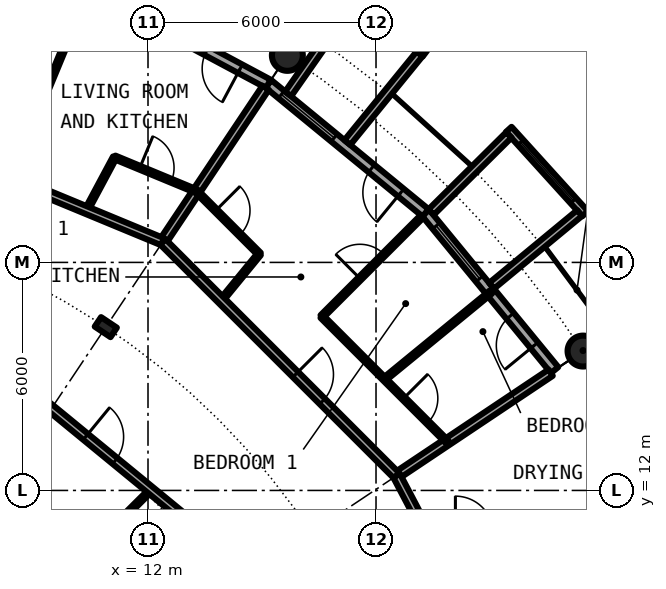
"""IFC4 building model, lengths in metres.
Left out: names, types, materials, properties, quantities, classifications, styles, units other than length and angle.
Written with IfcOpenShell. Run it as: python <this file> out.ifc"""

import sys

from ifc_helpers import new_model, si_unit, direction, frame, frame_2d, origin, origin_2d, place, context, subcontext, project, spatial, rectangle, circle, hollow_circle, i_section, extrude, element, fill, save


model = new_model("IFC4")
c1 = context("Model", 3, precision=1e-05, world=origin(), true_north=direction((0.0, 1.0)))
c2 = subcontext(c1, "Body", "Model", "MODEL_VIEW")
j1 = project(units=[si_unit("LENGTHUNIT", "METRE"), si_unit("PLANEANGLEUNIT", "RADIAN")], contexts=[c1])
p1 = place(None, origin())
s1 = spatial("IfcSite", under=j1, at=p1, CompositionType="ELEMENT")
p2 = place(p1, origin())
s2 = spatial("IfcBuilding", under=s1, at=p2, CompositionType="ELEMENT")
p3 = place(p2, frame((0.0, 0.0, 170.75)))
s3 = spatial("IfcBuildingStorey", under=s2, at=p3, CompositionType="ELEMENT", Elevation=170.75)
for number, where, z_axis, x_axis in (
    (1, (23.448, 15.667, 0.0), (0.0, 0.0, 1.0), (1.0, 0.0, 0.0)),
    (2, (15.667, 23.448, 0.0), (0.0, 0.0, 1.0), (1.0, 0.0, 0.0)),
):
    element("IfcColumn", number, at=place(p3, frame(where, z_axis=z_axis, x_axis=x_axis)), inside=s3, PredefinedType="COLUMN", context=c2, shape_type="SweptSolid", body=[
        extrude(hollow_circle(Radius=0.406, WallThickness=0.04, at=origin_2d()), origin(), (0.0, 0.0, 1.0), 3.05),
    ])
p4 = place(p3, frame((10.889, 16.297, 0.0), z_axis=(0.0, 0.0, 1.0), x_axis=(0.55557023302, 0.831469612303, 0.0)))
e3 = element("IfcColumn", 3, at=p4, inside=s3, PredefinedType="COLUMN", context=c2, shape_type="SweptSolid", body=[
    extrude(i_section(OverallWidth=0.3, OverallDepth=0.5, WebThickness=0.014, FlangeThickness=0.028, FilletRadius=0.027, at=origin_2d()), origin(), (0.0, 0.0, 1.0), 3.05),
])
p5 = place(p3, frame((22.699, 15.167, 0.0), z_axis=(0.0, 0.0, 1.0), x_axis=(-0.634382322723, 0.773019449054, 0.0)))
e4 = element("IfcWall", 4, at=p5, inside=s3, PredefinedType="SOLIDWALL", context=c2, shape_type="SweptSolid", body=[
    extrude(rectangle(XDim=5.352, YDim=0.25, at=frame_2d((2.676, 0.0))), origin(), (0.0, 0.0, 1.0), 2.7),
])
p6 = place(p5, frame((0.841, 0.0, 0.0)))
e5 = element("IfcOpeningElement", 5, at=p6, cuts=e4, PredefinedType="OPENING", context=c2, shape_type="SweptSolid", body=[
    extrude(rectangle(XDim=1.0, YDim=2.2, at=frame_2d((0.5, 1.1))), frame((0.0, 0.135, 0.0), z_axis=(0.0, -1.0, 0.0), x_axis=(1.0, 0.0, 0.0)), (0.0, 0.0, 1.0), 0.27),
])
p7 = place(p5, frame((3.111, 0.0, 0.3)))
e6 = element("IfcOpeningElement", 6, at=p7, cuts=e4, PredefinedType="OPENING", context=c2, shape_type="SweptSolid", body=[
    extrude(rectangle(XDim=1.8, YDim=2.1, at=frame_2d((0.9, 1.05))), frame((0.0, 0.135, 0.0), z_axis=(0.0, -1.0, 0.0), x_axis=(1.0, 0.0, 0.0)), (0.0, 0.0, 1.0), 0.27),
])
p8 = place(p3, frame((23.503, 19.282, -0.03), z_axis=(0.0, 0.0, 1.0), x_axis=(-0.671506829416, 0.740998365753, 0.0)))
e7 = element("IfcWall", 7, at=p8, inside=s3, PredefinedType="SOLIDWALL", context=c2, shape_type="SweptSolid", body=[
    extrude(rectangle(XDim=2.993, YDim=0.2, at=frame_2d((1.497, 0.0))), origin(), (0.0, 0.0, 1.0), 2.73),
])
p9 = place(p8, frame((0.457, 0.0, 0.33)))
e8 = element("IfcOpeningElement", 8, at=p9, cuts=e7, PredefinedType="OPENING", context=c2, shape_type="SweptSolid", body=[
    extrude(circle(Radius=1.04, at=frame_2d((1.04, 1.04))), frame((0.0, 0.11, 0.0), z_axis=(0.0, -1.0, 0.0), x_axis=(1.0, 0.0, 0.0)), (0.0, 0.0, 1.0), 0.22),
])
p10 = place(p3, frame((21.041, 17.384, -0.03), z_axis=(0.0, 0.0, 1.0), x_axis=(0.770784861449, 0.63709551667, 0.0)))
e9 = element("IfcWall", 9, at=p10, inside=s3, PredefinedType="SOLIDWALL", context=c2, shape_type="SweptSolid", body=[
    extrude(rectangle(XDim=3.006, YDim=0.2, at=frame_2d((1.503, 0.0))), origin(), (0.0, 0.0, 1.0), 2.73),
])
p11 = place(p3, frame((19.45, 19.323, -0.03), z_axis=(0.0, 0.0, 1.0), x_axis=(0.709727076896, 0.704476739375, 0.0)))
e10 = element("IfcWall", 10, at=p11, inside=s3, PredefinedType="SOLIDWALL", context=c2, shape_type="SweptSolid", body=[
    extrude(rectangle(XDim=2.883, YDim=0.2, at=frame_2d((1.441, 0.0))), origin(), (0.0, 0.0, 1.0), 2.73),
])
p12 = place(p3, frame((19.304, 19.304, 0.0), z_axis=(0.0, 0.0, 1.0), x_axis=(-0.773019449054, 0.634382322723, 0.0)))
e11 = element("IfcWall", 11, at=p12, inside=s3, PredefinedType="SOLIDWALL", context=c2, shape_type="SweptSolid", body=[
    extrude(rectangle(XDim=5.352, YDim=0.25, at=frame_2d((2.676, 0.0))), origin(), (0.0, 0.0, 1.0), 2.7),
])
p13 = place(p12, frame((0.841, 0.0, 0.0)))
e12 = element("IfcOpeningElement", 12, at=p13, cuts=e11, PredefinedType="OPENING", context=c2, shape_type="SweptSolid", body=[
    extrude(rectangle(XDim=1.0, YDim=2.2, at=frame_2d((0.5, 1.1))), frame((0.0, 0.135, 0.0), z_axis=(0.0, -1.0, 0.0), x_axis=(1.0, 0.0, 0.0)), (0.0, 0.0, 1.0), 0.27),
])
p14 = place(p12, frame((3.111, 0.0, 0.3)))
e13 = element("IfcOpeningElement", 13, at=p14, cuts=e11, PredefinedType="OPENING", context=c2, shape_type="SweptSolid", body=[
    extrude(rectangle(XDim=1.8, YDim=2.1, at=frame_2d((0.9, 1.05))), frame((0.0, 0.135, 0.0), z_axis=(0.0, -1.0, 0.0), x_axis=(1.0, 0.0, 0.0)), (0.0, 0.0, 1.0), 0.27),
])
p15 = place(p3, frame((19.289, 23.497, -0.03), z_axis=(0.0, 0.0, 1.0), x_axis=(-0.797887588059, 0.602806268067, 0.0)))
e14 = element("IfcWall", 14, at=p15, inside=s3, PredefinedType="SOLIDWALL", context=c2, shape_type="SweptSolid", body=[
    extrude(rectangle(XDim=2.447, YDim=0.2, at=frame_2d((1.223, 0.0))), origin(), (0.0, 0.0, 1.0), 2.73),
])
p16 = place(p15, frame((0.183, 0.0, 0.33)))
e15 = element("IfcOpeningElement", 15, at=p16, cuts=e14, PredefinedType="OPENING", context=c2, shape_type="SweptSolid", body=[
    extrude(circle(Radius=1.04, at=frame_2d((1.04, 1.04))), frame((0.0, 0.11, 0.0), z_axis=(0.0, -1.0, 0.0), x_axis=(1.0, 0.0, 0.0)), (0.0, 0.0, 1.0), 0.22),
])
p17 = place(p3, frame((17.246, 21.155, -0.03), z_axis=(0.0, 0.0, 1.0), x_axis=(0.631741648902, 0.775179004516, 0.0)))
e16 = element("IfcWall", 16, at=p17, inside=s3, PredefinedType="SOLIDWALL", context=c2, shape_type="SweptSolid", body=[
    extrude(rectangle(XDim=3.006, YDim=0.2, at=frame_2d((1.503, 0.0))), origin(), (0.0, 0.0, 1.0), 2.73),
])
p18 = place(p3, frame((15.688, 22.433, -0.03), z_axis=(0.0, 0.0, 1.0), x_axis=(0.573260687834, 0.819373043115, 0.0)))
e17 = element("IfcWall", 17, at=p18, inside=s3, PredefinedType="SOLIDWALL", context=c2, shape_type="SweptSolid", body=[
    extrude(rectangle(XDim=2.925, YDim=0.2, at=frame_2d((1.463, 0.0))), origin(), (0.0, 0.0, 1.0), 2.73),
])
p19 = place(p3, frame((15.167, 22.699, 0.0), z_axis=(0.0, 0.0, 1.0), x_axis=(-0.881915646801, 0.471407246368, 0.0)))
e18 = element("IfcWall", 18, at=p19, inside=s3, PredefinedType="SOLIDWALL", context=c2, shape_type="SweptSolid", body=[
    extrude(rectangle(XDim=5.352, YDim=0.25, at=frame_2d((2.676, 0.0))), origin(), (0.0, 0.0, 1.0), 2.7),
])
p20 = place(p19, frame((0.841, 0.0, 0.0)))
e19 = element("IfcOpeningElement", 19, at=p20, cuts=e18, PredefinedType="OPENING", context=c2, shape_type="SweptSolid", body=[
    extrude(rectangle(XDim=1.0, YDim=2.2, at=frame_2d((0.5, 1.1))), frame((0.0, 0.135, 0.0), z_axis=(0.0, -1.0, 0.0), x_axis=(1.0, 0.0, 0.0)), (0.0, 0.0, 1.0), 0.27),
])
p21 = place(p19, frame((3.111, 0.0, 0.3)))
e20 = element("IfcOpeningElement", 20, at=p21, cuts=e18, PredefinedType="OPENING", context=c2, shape_type="SweptSolid", body=[
    extrude(rectangle(XDim=1.8, YDim=2.1, at=frame_2d((0.9, 1.05))), frame((0.0, 0.135, 0.0), z_axis=(0.0, -1.0, 0.0), x_axis=(1.0, 0.0, 0.0)), (0.0, 0.0, 1.0), 0.27),
])
p22 = place(p3, frame((10.38, 19.374, 0.0), z_axis=(0.0, 0.0, 1.0), x_axis=(0.472002235476, 0.881597351236, 0.0)))
e21 = element("IfcWall", 21, at=p22, inside=s3, PredefinedType="PARTITIONING", context=c2, shape_type="SweptSolid", body=[
    extrude(rectangle(XDim=1.577, YDim=0.1, at=frame_2d((0.788, 0.0))), origin(), (0.0, 0.0, 1.0), 2.7),
])
p23 = place(p3, frame((8.97, 21.657, 0.0), z_axis=(0.0, 0.0, 1.0), x_axis=(0.382761856702, 0.923847044188, 0.0)))
e22 = element("IfcWall", 22, at=p23, inside=s3, PredefinedType="PARTITIONING", context=c2, shape_type="SweptSolid", body=[
    extrude(rectangle(XDim=3.733, YDim=0.1, at=frame_2d((1.867, 0.0))), origin(), (0.0, 0.0, 1.0), 2.7),
])
p24 = place(p23, frame((1.417, 0.0, 0.0)))
e23 = element("IfcOpeningElement", 23, at=p24, cuts=e22, PredefinedType="OPENING", context=c2, shape_type="SweptSolid", body=[
    extrude(rectangle(XDim=0.9, YDim=2.3, at=frame_2d((0.45, 1.15))), frame((0.0, 0.06, 0.0), z_axis=(0.0, -1.0, 0.0), x_axis=(1.0, 0.0, 0.0)), (0.0, 0.0, 1.0), 0.12),
])
p25 = place(p3, frame((9.148, 9.1, 0.0), z_axis=(0.0, 0.0, 1.0), x_axis=(0.708822693149, 0.705386695138, 0.0)))
e24 = element("IfcWall", 24, at=p25, inside=s3, PredefinedType="PARTITIONING", context=c2, shape_type="SweptSolid", body=[
    extrude(rectangle(XDim=4.121, YDim=0.1, at=frame_2d((2.061, 0.0))), origin(), (0.0, 0.0, 1.0), 2.7),
])
p26 = place(p25, frame((1.611, 0.0, 0.0)))
e25 = element("IfcOpeningElement", 25, at=p26, cuts=e24, PredefinedType="OPENING", context=c2, shape_type="SweptSolid", body=[
    extrude(rectangle(XDim=0.9, YDim=2.3, at=frame_2d((0.45, 1.15))), frame((0.0, 0.06, 0.0), z_axis=(0.0, -1.0, 0.0), x_axis=(1.0, 0.0, 0.0)), (0.0, 0.0, 1.0), 0.12),
])
p27 = place(p3, frame((12.388, 18.543, 0.0), z_axis=(0.0, 0.0, 1.0), x_axis=(0.55555521993, 0.831479643532, 0.0)))
e26 = element("IfcWall", 26, at=p27, inside=s3, PredefinedType="PARTITIONING", context=c2, shape_type="SweptSolid", body=[
    extrude(rectangle(XDim=4.875, YDim=0.2, at=frame_2d((2.437, 0.0))), origin(), (0.0, 0.0, 1.0), 2.7),
])
p28 = place(p3, frame((13.93, 17.001, 0.0), z_axis=(0.0, 0.0, 1.0), x_axis=(0.633633636523, 0.773633255921, 0.0)))
e27 = element("IfcWall", 27, at=p28, inside=s3, PredefinedType="PARTITIONING", context=c2, shape_type="SweptSolid", body=[
    extrude(rectangle(XDim=1.578, YDim=0.1, at=frame_2d((0.789, 0.0))), origin(), (0.0, 0.0, 1.0), 2.7),
])
p29 = place(p3, frame((16.575, 16.575, 0.0), z_axis=(0.0, 0.0, 1.0), x_axis=(0.707106781187, 0.707106781187, 0.0)))
e28 = element("IfcWall", 28, at=p29, inside=s3, PredefinedType="PARTITIONING", context=c2, shape_type="SweptSolid", body=[
    extrude(rectangle(XDim=3.735, YDim=0.1, at=frame_2d((1.868, 0.0))), origin(), (0.0, 0.0, 1.0), 2.7),
])
p30 = place(p29, frame((1.417, 0.0, 0.0)))
e29 = element("IfcOpeningElement", 29, at=p30, cuts=e28, PredefinedType="OPENING", context=c2, shape_type="SweptSolid", body=[
    extrude(rectangle(XDim=0.9, YDim=2.3, at=frame_2d((0.45, 1.15))), frame((0.0, 0.06, 0.0), z_axis=(0.0, -1.0, 0.0), x_axis=(1.0, 0.0, 0.0)), (0.0, 0.0, 1.0), 0.12),
])
p31 = place(p3, frame((18.224, 14.927, 0.0), z_axis=(0.0, 0.0, 1.0), x_axis=(0.773548271597, 0.633737383709, 0.0)))
e30 = element("IfcWall", 30, at=p31, inside=s3, PredefinedType="PARTITIONING", context=c2, shape_type="SweptSolid", body=[
    extrude(rectangle(XDim=3.618, YDim=0.1, at=frame_2d((1.809, 0.0))), origin(), (0.0, 0.0, 1.0), 2.7),
])
p32 = place(p3, frame((18.542, 12.389, 0.0), z_axis=(0.0, 0.0, 1.0), x_axis=(0.831387096605, 0.55569370664, 0.0)))
e31 = element("IfcWall", 31, at=p32, inside=s3, PredefinedType="PARTITIONING", context=c2, shape_type="SweptSolid", body=[
    extrude(rectangle(XDim=4.875, YDim=0.2, at=frame_2d((2.438, 0.0))), origin(), (0.0, 0.0, 1.0), 2.7),
])
p33 = place(p3, frame((6.773, 16.353, 0.0), z_axis=(0.0, 0.0, 1.0), x_axis=(0.773034536097, -0.634363938131, 0.0)))
e32 = element("IfcWall", 32, at=p33, inside=s3, PredefinedType="PARTITIONING", context=c2, shape_type="SweptSolid", body=[
    extrude(rectangle(XDim=10.277, YDim=0.2, at=frame_2d((5.138, 0.0))), origin(), (0.0, 0.0, 1.0), 2.7),
])
p34 = place(p33, frame((4.638, 0.0, 0.0)))
e33 = element("IfcOpeningElement", 33, at=p34, cuts=e32, PredefinedType="OPENING", context=c2, shape_type="SweptSolid", body=[
    extrude(rectangle(XDim=1.0, YDim=2.3, at=frame_2d((0.5, 1.15))), frame((0.0, 0.11, 0.0), z_axis=(0.0, -1.0, 0.0), x_axis=(1.0, 0.0, 0.0)), (0.0, 0.0, 1.0), 0.22),
])
p35 = place(p3, frame((4.347, 21.872, 0.0), z_axis=(0.0, 0.0, 1.0), x_axis=(0.923921124994, -0.382583003792, 0.0)))
e34 = element("IfcWall", 34, at=p35, inside=s3, PredefinedType="PARTITIONING", context=c2, shape_type="SweptSolid", body=[
    extrude(rectangle(XDim=8.704, YDim=0.2, at=frame_2d((4.352, 0.0))), origin(), (0.0, 0.0, 1.0), 2.7),
])
p36 = place(p35, frame((2.767, 0.0, 0.0)))
e35 = element("IfcOpeningElement", 35, at=p36, cuts=e34, PredefinedType="OPENING", context=c2, shape_type="SweptSolid", body=[
    extrude(rectangle(XDim=1.0, YDim=2.3, at=frame_2d((0.5, 1.15))), frame((0.0, 0.11, 0.0), z_axis=(0.0, -1.0, 0.0), x_axis=(1.0, 0.0, 0.0)), (0.0, 0.0, 1.0), 0.22),
])
p37 = place(p3, frame((12.389, 18.542, 0.0), z_axis=(0.0, 0.0, 1.0), x_axis=(0.707106781187, -0.707106781187, 0.0)))
e36 = element("IfcWall", 36, at=p37, inside=s3, PredefinedType="PARTITIONING", context=c2, shape_type="SweptSolid", body=[
    extrude(rectangle(XDim=8.702, YDim=0.2, at=frame_2d((4.351, 0.0))), origin(), (0.0, 0.0, 1.0), 2.7),
])
p38 = place(p37, frame((4.938, 0.0, 0.0)))
e37 = element("IfcOpeningElement", 37, at=p38, cuts=e36, PredefinedType="OPENING", context=c2, shape_type="SweptSolid", body=[
    extrude(rectangle(XDim=1.0, YDim=2.3, at=frame_2d((0.5, 1.15))), frame((0.0, 0.11, 0.0), z_axis=(0.0, -1.0, 0.0), x_axis=(1.0, 0.0, 0.0)), (0.0, 0.0, 1.0), 0.22),
])
p39 = place(p3, frame((18.542, 12.389, 0.0), z_axis=(0.0, 0.0, 1.0), x_axis=(0.465605550524, -0.884992356646, 0.0)))
e38 = element("IfcWall", 38, at=p39, inside=s3, PredefinedType="PARTITIONING", context=c2, shape_type="SweptSolid", body=[
    extrude(rectangle(XDim=1.643, YDim=0.2, at=frame_2d((0.821, 0.0))), origin(), (0.0, 0.0, 1.0), 2.7),
])
p40 = place(p3, frame((11.124, 20.764, 0.0), z_axis=(0.0, 0.0, 1.0), x_axis=(0.923938991376, -0.382539854414, 0.0)))
e39 = element("IfcWall", 39, at=p40, inside=s3, PredefinedType="PARTITIONING", context=c2, shape_type="SweptSolid", body=[
    extrude(rectangle(XDim=2.331, YDim=0.1, at=frame_2d((1.166, 0.0))), origin(), (0.0, 0.0, 1.0), 2.7),
])
p41 = place(p40, frame((0.716, 0.0, 0.0)))
e40 = element("IfcOpeningElement", 40, at=p41, cuts=e39, PredefinedType="OPENING", context=c2, shape_type="SweptSolid", body=[
    extrude(rectangle(XDim=0.9, YDim=2.3, at=frame_2d((0.45, 1.15))), frame((0.0, 0.06, 0.0), z_axis=(0.0, -1.0, 0.0), x_axis=(1.0, 0.0, 0.0)), (0.0, 0.0, 1.0), 0.12),
])
p42 = place(p3, frame((13.283, 19.867, 0.0), z_axis=(0.0, 0.0, 1.0), x_axis=(0.707106781187, -0.707106781187, 0.0)))
e41 = element("IfcWall", 41, at=p42, inside=s3, PredefinedType="PARTITIONING", context=c2, shape_type="SweptSolid", body=[
    extrude(rectangle(XDim=2.332, YDim=0.1, at=frame_2d((1.166, 0.0))), origin(), (0.0, 0.0, 1.0), 2.7),
])
p43 = place(p42, frame((0.709, 0.0, 0.0)))
e42 = element("IfcOpeningElement", 42, at=p43, cuts=e41, PredefinedType="OPENING", context=c2, shape_type="SweptSolid", body=[
    extrude(rectangle(XDim=0.9, YDim=2.3, at=frame_2d((0.45, 1.15))), frame((0.0, 0.06, 0.0), z_axis=(0.0, -1.0, 0.0), x_axis=(1.0, 0.0, 0.0)), (0.0, 0.0, 1.0), 0.12),
])
p44 = place(p3, frame((16.575, 16.575, 0.0), z_axis=(0.0, 0.0, 1.0), x_axis=(0.707132961115, -0.707080600289, 0.0)))
e43 = element("IfcWall", 43, at=p44, inside=s3, PredefinedType="PARTITIONING", context=c2, shape_type="SweptSolid", body=[
    extrude(rectangle(XDim=4.663, YDim=0.1, at=frame_2d((2.331, 0.0))), origin(), (0.0, 0.0, 1.0), 2.7),
])
p45 = place(p44, frame((3.043, 0.0, 0.0)))
e44 = element("IfcOpeningElement", 44, at=p45, cuts=e43, PredefinedType="OPENING", context=c2, shape_type="SweptSolid", body=[
    extrude(rectangle(XDim=0.9, YDim=2.3, at=frame_2d((0.45, 1.15))), frame((0.0, 0.06, 0.0), z_axis=(0.0, -1.0, 0.0), x_axis=(1.0, 0.0, 0.0)), (0.0, 0.0, 1.0), 0.12),
])
p46 = place(p6, origin())
e45 = element("IfcDoor", 45, at=p46, inside=s3, OperationType="SINGLE_SWING_LEFT", PredefinedType="DOOR", context=c2, shape_type="SweptSolid", body=[
    extrude(rectangle(XDim=1.0, YDim=2.2, at=frame_2d((0.5, 1.1))), frame((0.0, 0.025, 0.0), z_axis=(0.0, -1.0, 0.0), x_axis=(1.0, 0.0, 0.0)), (0.0, 0.0, 1.0), 0.05),
])
fill(e5, e45)
p47 = place(p7, origin())
e46 = element("IfcWindow", 46, at=p47, inside=s3, PartitioningType="SINGLE_PANEL", PredefinedType="WINDOW", context=c2, shape_type="SweptSolid", body=[
    extrude(rectangle(XDim=1.8, YDim=2.1, at=frame_2d((0.9, 1.05))), frame((0.0, 0.03, 0.0), z_axis=(0.0, -1.0, 0.0), x_axis=(1.0, 0.0, 0.0)), (0.0, 0.0, 1.0), 0.06),
])
fill(e6, e46)
p48 = place(p9, origin())
e47 = element("IfcWindow", 47, at=p48, inside=s3, PartitioningType="SINGLE_PANEL", PredefinedType="WINDOW", context=c2, shape_type="SweptSolid", body=[
    extrude(circle(Radius=1.04, at=frame_2d((1.04, 1.04))), frame((0.0, 0.03, 0.0), z_axis=(0.0, -1.0, 0.0), x_axis=(1.0, 0.0, 0.0)), (0.0, 0.0, 1.0), 0.06),
])
fill(e8, e47)
p49 = place(p13, origin())
e48 = element("IfcDoor", 48, at=p49, inside=s3, OperationType="SINGLE_SWING_LEFT", PredefinedType="DOOR", context=c2, shape_type="SweptSolid", body=[
    extrude(rectangle(XDim=1.0, YDim=2.2, at=frame_2d((0.5, 1.1))), frame((0.0, 0.025, 0.0), z_axis=(0.0, -1.0, 0.0), x_axis=(1.0, 0.0, 0.0)), (0.0, 0.0, 1.0), 0.05),
])
fill(e12, e48)
p50 = place(p14, origin())
e49 = element("IfcWindow", 49, at=p50, inside=s3, PartitioningType="SINGLE_PANEL", PredefinedType="WINDOW", context=c2, shape_type="SweptSolid", body=[
    extrude(rectangle(XDim=1.8, YDim=2.1, at=frame_2d((0.9, 1.05))), frame((0.0, 0.03, 0.0), z_axis=(0.0, -1.0, 0.0), x_axis=(1.0, 0.0, 0.0)), (0.0, 0.0, 1.0), 0.06),
])
fill(e13, e49)
p51 = place(p20, origin())
e50 = element("IfcDoor", 50, at=p51, inside=s3, OperationType="SINGLE_SWING_LEFT", PredefinedType="DOOR", context=c2, shape_type="SweptSolid", body=[
    extrude(rectangle(XDim=1.0, YDim=2.2, at=frame_2d((0.5, 1.1))), frame((0.0, 0.025, 0.0), z_axis=(0.0, -1.0, 0.0), x_axis=(1.0, 0.0, 0.0)), (0.0, 0.0, 1.0), 0.05),
])
fill(e19, e50)
p52 = place(p38, origin())
e51 = element("IfcDoor", 51, at=p52, inside=s3, OperationType="SINGLE_SWING_RIGHT", PredefinedType="DOOR", context=c2, shape_type="SweptSolid", body=[
    extrude(rectangle(XDim=1.0, YDim=2.3, at=frame_2d((0.5, 1.15))), frame((0.0, 0.025, 0.0), z_axis=(0.0, -1.0, 0.0), x_axis=(1.0, 0.0, 0.0)), (0.0, 0.0, 1.0), 0.05),
])
fill(e37, e51)
p53 = place(p43, origin())
e52 = element("IfcDoor", 52, at=p53, inside=s3, OperationType="SINGLE_SWING_LEFT", PredefinedType="DOOR", context=c2, shape_type="SweptSolid", body=[
    extrude(rectangle(XDim=0.9, YDim=2.3, at=frame_2d((0.45, 1.15))), frame((0.0, 0.025, 0.0), z_axis=(0.0, -1.0, 0.0), x_axis=(1.0, 0.0, 0.0)), (0.0, 0.0, 1.0), 0.05),
])
fill(e42, e52)
p54 = place(p30, origin())
e53 = element("IfcDoor", 53, at=p54, inside=s3, OperationType="SINGLE_SWING_RIGHT", PredefinedType="DOOR", context=c2, shape_type="SweptSolid", body=[
    extrude(rectangle(XDim=0.9, YDim=2.3, at=frame_2d((0.45, 1.15))), frame((0.0, 0.025, 0.0), z_axis=(0.0, -1.0, 0.0), x_axis=(1.0, 0.0, 0.0)), (0.0, 0.0, 1.0), 0.05),
])
fill(e29, e53)
p55 = place(p45, origin())
e54 = element("IfcDoor", 54, at=p55, inside=s3, OperationType="SINGLE_SWING_RIGHT", PredefinedType="DOOR", context=c2, shape_type="SweptSolid", body=[
    extrude(rectangle(XDim=0.9, YDim=2.3, at=frame_2d((0.45, 1.15))), frame((0.0, 0.025, 0.0), z_axis=(0.0, -1.0, 0.0), x_axis=(1.0, 0.0, 0.0)), (0.0, 0.0, 1.0), 0.05),
])
fill(e44, e54)
p56 = place(p41, origin())
e55 = element("IfcDoor", 55, at=p56, inside=s3, OperationType="SINGLE_SWING_LEFT", PredefinedType="DOOR", context=c2, shape_type="SweptSolid", body=[
    extrude(rectangle(XDim=0.9, YDim=2.3, at=frame_2d((0.45, 1.15))), frame((0.0, 0.025, 0.0), z_axis=(0.0, -1.0, 0.0), x_axis=(1.0, 0.0, 0.0)), (0.0, 0.0, 1.0), 0.05),
])
fill(e40, e55)
p57 = place(p24, origin())
e56 = element("IfcDoor", 56, at=p57, inside=s3, OperationType="SINGLE_SWING_LEFT", PredefinedType="DOOR", context=c2, shape_type="SweptSolid", body=[
    extrude(rectangle(XDim=0.9, YDim=2.3, at=frame_2d((0.45, 1.15))), frame((0.0, 0.025, 0.0), z_axis=(0.0, -1.0, 0.0), x_axis=(1.0, 0.0, 0.0)), (0.0, 0.0, 1.0), 0.05),
])
fill(e23, e56)
p58 = place(p34, origin())
e57 = element("IfcDoor", 57, at=p58, inside=s3, OperationType="SINGLE_SWING_RIGHT", PredefinedType="DOOR", context=c2, shape_type="SweptSolid", body=[
    extrude(rectangle(XDim=1.0, YDim=2.3, at=frame_2d((0.5, 1.15))), frame((0.0, 0.025, 0.0), z_axis=(0.0, -1.0, 0.0), x_axis=(1.0, 0.0, 0.0)), (0.0, 0.0, 1.0), 0.05),
])
fill(e33, e57)
save(model, sys.argv[1])
